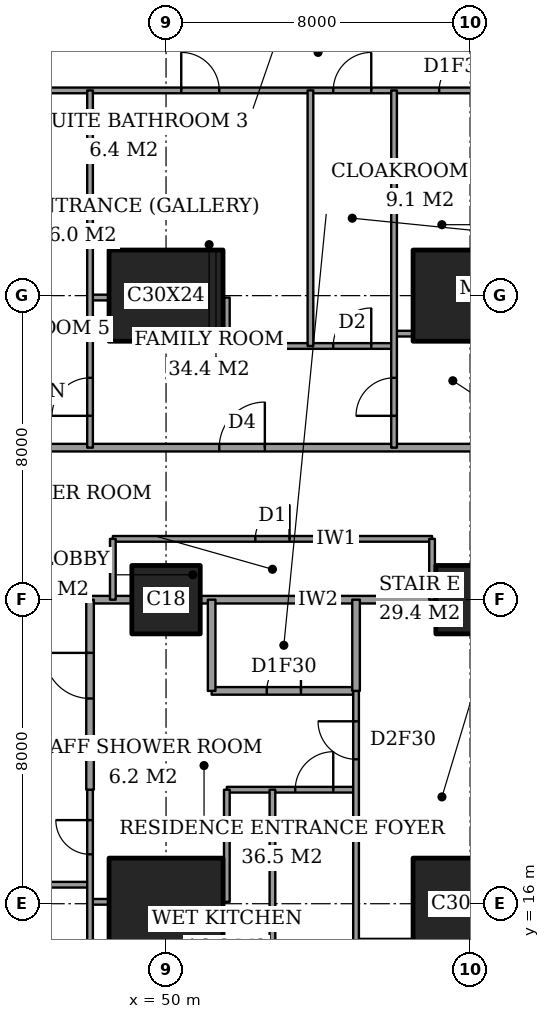
"""IFC4 building model, lengths in metres.
Left out: names, types, materials, properties, quantities, classifications, styles, units other than length and angle.
Written with IfcOpenShell. Run it as: python <this file> out.ifc"""

import sys

from ifc_helpers import new_model, si_unit, direction, frame, frame_2d, origin, origin_2d, place, context, subcontext, project, spatial, rectangle, extrude, element, fill, save


model = new_model("IFC4")
c1 = context("Model", 3, precision=1e-05, world=origin(), true_north=direction((0.0, 1.0)))
c2 = subcontext(c1, "Body", "Model", "MODEL_VIEW")
j1 = project(units=[si_unit("LENGTHUNIT", "METRE"), si_unit("PLANEANGLEUNIT", "RADIAN")], contexts=[c1])
p1 = place(None, origin())
s1 = spatial("IfcSite", under=j1, at=p1, CompositionType="ELEMENT")
p2 = place(p1, origin())
s2 = spatial("IfcBuilding", under=s1, at=p2, CompositionType="ELEMENT")
p3 = place(p2, frame((0.0, 0.0, 196.6)))
s3 = spatial("IfcBuildingStorey", under=s2, at=p3, CompositionType="ELEMENT", Elevation=196.6)
p4 = place(p3, frame((50.0, 16.0, 0.0), z_axis=(0.0, 0.0, 1.0), x_axis=(1.0, 0.0, 0.0)))
e1 = element("IfcColumn", 1, at=p4, inside=s3, PredefinedType="COLUMN", context=c2, shape_type="SweptSolid", body=[
    extrude(rectangle(XDim=3.0, YDim=2.4, at=origin_2d()), origin(), (0.0, 0.0, 1.0), 3.6),
])
p5 = place(p3, frame((50.0, 24.0, 0.0), z_axis=(0.0, 0.0, 1.0), x_axis=(1.0, 0.0, 0.0)))
e2 = element("IfcColumn", 2, at=p5, inside=s3, PredefinedType="COLUMN", context=c2, shape_type="SweptSolid", body=[
    extrude(rectangle(XDim=1.8, YDim=1.8, at=origin_2d()), origin(), (0.0, 0.0, 1.0), 3.6),
])
for number, where, z_axis, x_axis in (
    (3, (50.0, 32.0, 0.0), (0.0, 0.0, 1.0), (1.0, 0.0, 0.0)),
    (4, (58.0, 16.0, 0.0), (0.0, 0.0, 1.0), (1.0, 0.0, 0.0)),
):
    element("IfcColumn", number, at=place(p3, frame(where, z_axis=z_axis, x_axis=x_axis)), inside=s3, PredefinedType="COLUMN", context=c2, shape_type="SweptSolid", body=[
        extrude(rectangle(XDim=3.0, YDim=2.4, at=origin_2d()), origin(), (0.0, 0.0, 1.0), 3.6),
    ])
p6 = place(p3, frame((58.0, 24.0, 0.0), z_axis=(0.0, 0.0, 1.0), x_axis=(1.0, 0.0, 0.0)))
e5 = element("IfcColumn", 5, at=p6, inside=s3, PredefinedType="COLUMN", context=c2, shape_type="SweptSolid", body=[
    extrude(rectangle(XDim=1.8, YDim=1.8, at=origin_2d()), origin(), (0.0, 0.0, 1.0), 3.6),
])
p7 = place(p3, frame((58.0, 32.0, 0.0), z_axis=(0.0, 0.0, 1.0), x_axis=(1.0, 0.0, 0.0)))
e6 = element("IfcColumn", 6, at=p7, inside=s3, PredefinedType="COLUMN", context=c2, shape_type="SweptSolid", body=[
    extrude(rectangle(XDim=3.0, YDim=2.4, at=origin_2d()), origin(), (0.0, 0.0, 1.0), 3.6),
])
p8 = place(p3, frame((55.0, 15.0, 0.0), z_axis=(0.0, 0.0, 1.0), x_axis=(1.0, 0.0, 0.0)))
e7 = element("IfcWall", 7, at=p8, inside=s3, PredefinedType="PARTITIONING", context=c2, shape_type="SweptSolid", body=[
    extrude(rectangle(XDim=1.5, YDim=0.15, at=frame_2d((0.75, 0.0))), origin(), (0.0, 0.0, 1.0), 3.35),
])
p9 = place(p3, frame((48.0, 16.05, 0.0), z_axis=(0.0, 0.0, 1.0), x_axis=(1.0, 0.0, 0.0)))
e8 = element("IfcWall", 8, at=p9, inside=s3, PredefinedType="PARTITIONING", context=c2, shape_type="SweptSolid", body=[
    extrude(rectangle(XDim=0.5, YDim=0.15, at=frame_2d((0.25, 0.0))), origin(), (0.0, 0.0, 1.0), 3.35),
])
p10 = place(p3, frame((42.0, 16.5, 0.0), z_axis=(0.0, 0.0, 1.0), x_axis=(1.0, 0.0, 0.0)))
e9 = element("IfcWall", 9, at=p10, inside=s3, PredefinedType="PARTITIONING", context=c2, shape_type="SweptSolid", body=[
    extrude(rectangle(XDim=6.0, YDim=0.15, at=frame_2d((3.0, 0.0))), origin(), (0.0, 0.0, 1.0), 3.35),
])
p11 = place(p3, frame((51.6, 19.0, 0.0), z_axis=(0.0, 0.0, 1.0), x_axis=(1.0, 0.0, 0.0)))
e10 = element("IfcWall", 10, at=p11, inside=s3, PredefinedType="PARTITIONING", context=c2, shape_type="SweptSolid", body=[
    extrude(rectangle(XDim=3.4, YDim=0.15, at=frame_2d((1.7, 0.0))), origin(), (0.0, 0.0, 1.0), 3.35),
])
p12 = place(p11, frame((1.8, 0.0, 0.0)))
e11 = element("IfcOpeningElement", 11, at=p12, cuts=e10, PredefinedType="OPENING", context=c2, shape_type="SweptSolid", body=[
    extrude(rectangle(XDim=1.0, YDim=2.1, at=frame_2d((0.5, 1.05))), frame((0.0, 0.085, 0.0), z_axis=(0.0, -1.0, 0.0), x_axis=(1.0, 0.0, 0.0)), (0.0, 0.0, 1.0), 0.17),
])
p13 = place(p3, frame((42.0, 20.0, 0.0), z_axis=(0.0, 0.0, 1.0), x_axis=(1.0, 0.0, 0.0)))
e12 = element("IfcWall", 12, at=p13, inside=s3, PredefinedType="PARTITIONING", context=c2, shape_type="SweptSolid", body=[
    extrude(rectangle(XDim=6.0, YDim=0.2, at=frame_2d((3.0, 0.0))), origin(), (0.0, 0.0, 1.0), 3.35),
])
p14 = place(p3, frame((51.2, 21.6, 0.0), z_axis=(0.0, 0.0, 1.0), x_axis=(1.0, 0.0, 0.0)))
e13 = element("IfcWall", 13, at=p14, inside=s3, PredefinedType="PARTITIONING", context=c2, shape_type="SweptSolid", body=[
    extrude(rectangle(XDim=3.8, YDim=0.2, at=frame_2d((1.9, 0.0))), origin(), (0.0, 0.0, 1.0), 3.35),
])
p15 = place(p14, frame((1.45, 0.0, 0.0)))
e14 = element("IfcOpeningElement", 14, at=p15, cuts=e13, PredefinedType="OPENING", context=c2, shape_type="SweptSolid", body=[
    extrude(rectangle(XDim=0.9, YDim=2.1, at=frame_2d((0.45, 1.05))), frame((0.0, 0.11, 0.0), z_axis=(0.0, -1.0, 0.0), x_axis=(1.0, 0.0, 0.0)), (0.0, 0.0, 1.0), 0.22),
])
p16 = place(p3, frame((48.0, 24.0, 0.0), z_axis=(0.0, 0.0, 1.0), x_axis=(1.0, 0.0, 0.0)))
e15 = element("IfcWall", 15, at=p16, inside=s3, PredefinedType="PARTITIONING", context=c2, shape_type="SweptSolid", body=[
    extrude(rectangle(XDim=1.1, YDim=0.2, at=frame_2d((0.55, 0.0))), origin(), (0.0, 0.0, 1.0), 3.35),
])
p17 = place(p3, frame((50.9, 24.0, 0.0), z_axis=(0.0, 0.0, 1.0), x_axis=(1.0, 0.0, 0.0)))
e16 = element("IfcWall", 16, at=p17, inside=s3, PredefinedType="PARTITIONING", context=c2, shape_type="SweptSolid", body=[
    extrude(rectangle(XDim=6.2, YDim=0.2, at=frame_2d((3.1, 0.0))), origin(), (0.0, 0.0, 1.0), 3.35),
])
p18 = place(p3, frame((48.6, 25.6, 0.0), z_axis=(0.0, 0.0, 1.0), x_axis=(1.0, 0.0, 0.0)))
e17 = element("IfcWall", 17, at=p18, inside=s3, PredefinedType="PARTITIONING", context=c2, shape_type="SweptSolid", body=[
    extrude(rectangle(XDim=8.4, YDim=0.15, at=frame_2d((4.2, 0.0))), origin(), (0.0, 0.0, 1.0), 3.35),
])
p19 = place(p18, frame((3.75, 0.0, 0.0)))
e18 = element("IfcOpeningElement", 18, at=p19, cuts=e17, PredefinedType="OPENING", context=c2, shape_type="SweptSolid", body=[
    extrude(rectangle(XDim=0.9, YDim=2.1, at=frame_2d((0.45, 1.05))), frame((0.0, 0.085, 0.0), z_axis=(0.0, -1.0, 0.0), x_axis=(1.0, 0.0, 0.0)), (0.0, 0.0, 1.0), 0.17),
])
p20 = place(p3, frame((42.0, 28.0, 0.0), z_axis=(0.0, 0.0, 1.0), x_axis=(1.0, 0.0, 0.0)))
e19 = element("IfcWall", 19, at=p20, inside=s3, PredefinedType="PARTITIONING", context=c2, shape_type="SweptSolid", body=[
    extrude(rectangle(XDim=17.275, YDim=0.2, at=frame_2d((8.637, 0.0))), origin(), (0.0, 0.0, 1.0), 3.35),
])
p21 = place(p20, frame((9.4, 0.0, 0.0)))
e20 = element("IfcOpeningElement", 20, at=p21, cuts=e19, PredefinedType="OPENING", context=c2, shape_type="SweptSolid", body=[
    extrude(rectangle(XDim=1.2, YDim=2.4, at=frame_2d((0.6, 1.2))), frame((0.0, 0.11, 0.0), z_axis=(0.0, -1.0, 0.0), x_axis=(1.0, 0.0, 0.0)), (0.0, 0.0, 1.0), 0.22),
])
p22 = place(p3, frame((51.6, 30.675, 0.0), z_axis=(0.0, 0.0, 1.0), x_axis=(1.0, 0.0, 0.0)))
e21 = element("IfcWall", 21, at=p22, inside=s3, PredefinedType="PARTITIONING", context=c2, shape_type="SweptSolid", body=[
    extrude(rectangle(XDim=4.4, YDim=0.15, at=frame_2d((2.2, 0.0))), origin(), (0.0, 0.0, 1.0), 3.35),
])
p23 = place(p22, frame((2.8, 0.0, 0.0)))
e22 = element("IfcOpeningElement", 22, at=p23, cuts=e21, PredefinedType="OPENING", context=c2, shape_type="SweptSolid", body=[
    extrude(rectangle(XDim=1.0, YDim=2.1, at=frame_2d((0.5, 1.05))), frame((0.0, 0.085, 0.0), z_axis=(0.0, -1.0, 0.0), x_axis=(1.0, 0.0, 0.0)), (0.0, 0.0, 1.0), 0.17),
])
p24 = place(p3, frame((42.0, 31.0, 0.0), z_axis=(0.0, 0.0, 1.0), x_axis=(1.0, 0.0, 0.0)))
e23 = element("IfcWall", 23, at=p24, inside=s3, PredefinedType="PARTITIONING", context=c2, shape_type="SweptSolid", body=[
    extrude(rectangle(XDim=6.0, YDim=0.15, at=frame_2d((3.0, 0.0))), origin(), (0.0, 0.0, 1.0), 3.35),
])
for number, where, z_axis, x_axis in (
    (24, (56.0, 31.0, 0.0), (0.0, 0.0, 1.0), (1.0, 0.0, 0.0)),
    (25, (48.0, 31.95, 0.0), (0.0, 0.0, 1.0), (1.0, 0.0, 0.0)),
):
    element("IfcWall", number, at=place(p3, frame(where, z_axis=z_axis, x_axis=x_axis)), inside=s3, PredefinedType="PARTITIONING", context=c2, shape_type="SweptSolid", body=[
        extrude(rectangle(XDim=0.5, YDim=0.15, at=frame_2d((0.25, 0.0))), origin(), (0.0, 0.0, 1.0), 3.35),
    ])
p25 = place(p3, frame((45.6, 33.6, 0.0), z_axis=(0.0, 0.0, 1.0), x_axis=(1.0, 0.0, 0.0)))
e26 = element("IfcWall", 26, at=p25, inside=s3, PredefinedType="PARTITIONING", context=c2, shape_type="SweptSolid", body=[
    extrude(rectangle(XDim=2.4, YDim=0.15, at=frame_2d((1.2, 0.0))), origin(), (0.0, 0.0, 1.0), 3.35),
])
p26 = place(p3, frame((41.439, 37.4, 0.0), z_axis=(0.0, 0.0, 1.0), x_axis=(1.0, 0.0, 0.0)))
e27 = element("IfcWall", 27, at=p26, inside=s3, PredefinedType="PARTITIONING", context=c2, shape_type="SweptSolid", body=[
    extrude(rectangle(XDim=25.011, YDim=0.15, at=frame_2d((12.505, 0.0))), origin(), (0.0, 0.0, 1.0), 3.35),
])
p27 = place(p26, frame((12.961, 0.0, 0.0)))
e28 = element("IfcOpeningElement", 28, at=p27, cuts=e27, PredefinedType="OPENING", context=c2, shape_type="SweptSolid", body=[
    extrude(rectangle(XDim=1.0, YDim=2.1, at=frame_2d((0.5, 1.05))), frame((0.0, 0.085, 0.0), z_axis=(0.0, -1.0, 0.0), x_axis=(1.0, 0.0, 0.0)), (0.0, 0.0, 1.0), 0.17),
])
p28 = place(p26, frame((20.924, 0.0, 0.0)))
e29 = element("IfcOpeningElement", 29, at=p28, cuts=e27, PredefinedType="OPENING", context=c2, shape_type="SweptSolid", body=[
    extrude(rectangle(XDim=1.0, YDim=2.1, at=frame_2d((0.5, 1.05))), frame((0.0, 0.085, 0.0), z_axis=(0.0, -1.0, 0.0), x_axis=(1.0, 0.0, 0.0)), (0.0, 0.0, 1.0), 0.17),
])
p29 = place(p26, frame((15.749, 0.0, 0.0)))
e30 = element("IfcOpeningElement", 30, at=p29, cuts=e27, PredefinedType="OPENING", context=c2, shape_type="SweptSolid", body=[
    extrude(rectangle(XDim=0.9, YDim=2.1, at=frame_2d((0.45, 1.05))), frame((0.0, 0.085, 0.0), z_axis=(0.0, -1.0, 0.0), x_axis=(1.0, 0.0, 0.0)), (0.0, 0.0, 1.0), 0.17),
])
p30 = place(p26, frame((8.961, 0.0, 0.0)))
e31 = element("IfcOpeningElement", 31, at=p30, cuts=e27, PredefinedType="OPENING", context=c2, shape_type="SweptSolid", body=[
    extrude(rectangle(XDim=1.0, YDim=2.1, at=frame_2d((0.5, 1.05))), frame((0.0, 0.085, 0.0), z_axis=(0.0, -1.0, 0.0), x_axis=(1.0, 0.0, 0.0)), (0.0, 0.0, 1.0), 0.17),
])
p31 = place(p26, frame((2.836, 0.0, 0.0)))
e32 = element("IfcOpeningElement", 32, at=p31, cuts=e27, PredefinedType="OPENING", context=c2, shape_type="SweptSolid", body=[
    extrude(rectangle(XDim=1.0, YDim=2.1, at=frame_2d((0.5, 1.05))), frame((0.0, 0.085, 0.0), z_axis=(0.0, -1.0, 0.0), x_axis=(1.0, 0.0, 0.0)), (0.0, 0.0, 1.0), 0.17),
])
p32 = place(p3, frame((48.0, 19.0, 0.0), z_axis=(0.0, 0.0, 1.0), x_axis=(0.0, 1.0, 0.0)))
e33 = element("IfcWall", 33, at=p32, inside=s3, PredefinedType="PARTITIONING", context=c2, shape_type="SweptSolid", body=[
    extrude(rectangle(XDim=5.0, YDim=0.2, at=frame_2d((2.5, 0.0))), origin(), (0.0, 0.0, 1.0), 3.35),
])
p33 = place(p32, frame((2.4, 0.0, 0.0)))
e34 = element("IfcOpeningElement", 34, at=p33, cuts=e33, PredefinedType="OPENING", context=c2, shape_type="SweptSolid", body=[
    extrude(rectangle(XDim=1.2, YDim=2.4, at=frame_2d((0.6, 1.2))), frame((0.0, 0.11, 0.0), z_axis=(0.0, -1.0, 0.0), x_axis=(1.0, 0.0, 0.0)), (0.0, 0.0, 1.0), 0.22),
])
p34 = place(p3, frame((48.0, 10.6, 0.0), z_axis=(0.0, 0.0, 1.0), x_axis=(0.0, 1.0, 0.0)))
e35 = element("IfcWall", 35, at=p34, inside=s3, PredefinedType="PARTITIONING", context=c2, shape_type="SweptSolid", body=[
    extrude(rectangle(XDim=8.4, YDim=0.15, at=frame_2d((4.2, 0.0))), origin(), (0.0, 0.0, 1.0), 3.35),
])
p35 = place(p34, frame((6.7, 0.0, 0.0)))
e36 = element("IfcOpeningElement", 36, at=p35, cuts=e35, PredefinedType="OPENING", context=c2, shape_type="SweptSolid", body=[
    extrude(rectangle(XDim=0.9, YDim=2.1, at=frame_2d((0.45, 1.05))), frame((0.0, 0.085, 0.0), z_axis=(0.0, -1.0, 0.0), x_axis=(1.0, 0.0, 0.0)), (0.0, 0.0, 1.0), 0.17),
])
p36 = place(p3, frame((48.0, 28.0, 0.0), z_axis=(0.0, 0.0, 1.0), x_axis=(0.0, 1.0, 0.0)))
e37 = element("IfcWall", 37, at=p36, inside=s3, PredefinedType="PARTITIONING", context=c2, shape_type="SweptSolid", body=[
    extrude(rectangle(XDim=9.4, YDim=0.15, at=frame_2d((4.7, 0.0))), origin(), (0.0, 0.0, 1.0), 3.35),
])
p37 = place(p36, frame((0.837, 0.0, 0.0)))
e38 = element("IfcOpeningElement", 38, at=p37, cuts=e37, PredefinedType="OPENING", context=c2, shape_type="SweptSolid", body=[
    extrude(rectangle(XDim=1.0, YDim=2.1, at=frame_2d((0.5, 1.05))), frame((0.0, 0.085, 0.0), z_axis=(0.0, -1.0, 0.0), x_axis=(1.0, 0.0, 0.0)), (0.0, 0.0, 1.0), 0.17),
])
p38 = place(p3, frame((48.6, 24.0, 0.0), z_axis=(0.0, 0.0, 1.0), x_axis=(0.0, 1.0, 0.0)))
e39 = element("IfcWall", 39, at=p38, inside=s3, PredefinedType="PARTITIONING", context=c2, shape_type="SweptSolid", body=[
    extrude(rectangle(XDim=1.6, YDim=0.15, at=frame_2d((0.8, 0.0))), origin(), (0.0, 0.0, 1.0), 3.35),
])
p39 = place(p3, frame((51.2, 21.6, 0.0), z_axis=(0.0, 0.0, 1.0), x_axis=(0.0, 1.0, 0.0)))
e40 = element("IfcWall", 40, at=p39, inside=s3, PredefinedType="PARTITIONING", context=c2, shape_type="SweptSolid", body=[
    extrude(rectangle(XDim=2.4, YDim=0.2, at=frame_2d((1.2, 0.0))), origin(), (0.0, 0.0, 1.0), 3.35),
])
p40 = place(p3, frame((51.6, 16.05, 0.0), z_axis=(0.0, 0.0, 1.0), x_axis=(0.0, 1.0, 0.0)))
e41 = element("IfcWall", 41, at=p40, inside=s3, PredefinedType="PARTITIONING", context=c2, shape_type="SweptSolid", body=[
    extrude(rectangle(XDim=2.95, YDim=0.15, at=frame_2d((1.475, 0.0))), origin(), (0.0, 0.0, 1.0), 3.35),
])
p41 = place(p3, frame((51.6, 30.675, 0.0), z_axis=(0.0, 0.0, 1.0), x_axis=(0.0, 1.0, 0.0)))
e42 = element("IfcWall", 42, at=p41, inside=s3, PredefinedType="PARTITIONING", context=c2, shape_type="SweptSolid", body=[
    extrude(rectangle(XDim=1.275, YDim=0.15, at=frame_2d((0.637, 0.0))), origin(), (0.0, 0.0, 1.0), 3.35),
])
p42 = place(p3, frame((52.8, 10.6, 0.0), z_axis=(0.0, 0.0, 1.0), x_axis=(0.0, 1.0, 0.0)))
e43 = element("IfcWall", 43, at=p42, inside=s3, PredefinedType="PARTITIONING", context=c2, shape_type="SweptSolid", body=[
    extrude(rectangle(XDim=8.4, YDim=0.15, at=frame_2d((4.2, 0.0))), origin(), (0.0, 0.0, 1.0), 3.35),
])
p43 = place(p3, frame((53.8, 30.675, 0.0), z_axis=(0.0, 0.0, 1.0), x_axis=(0.0, 1.0, 0.0)))
e44 = element("IfcWall", 44, at=p43, inside=s3, PredefinedType="PARTITIONING", context=c2, shape_type="SweptSolid", body=[
    extrude(rectangle(XDim=6.725, YDim=0.15, at=frame_2d((3.362, 0.0))), origin(), (0.0, 0.0, 1.0), 3.35),
])
p44 = place(p3, frame((55.0, 21.6, 0.0), z_axis=(0.0, 0.0, 1.0), x_axis=(0.0, 1.0, 0.0)))
e45 = element("IfcWall", 45, at=p44, inside=s3, PredefinedType="PARTITIONING", context=c2, shape_type="SweptSolid", body=[
    extrude(rectangle(XDim=2.4, YDim=0.2, at=frame_2d((1.2, 0.0))), origin(), (0.0, 0.0, 1.0), 3.35),
])
p45 = place(p3, frame((55.0, 10.6, 0.0), z_axis=(0.0, 0.0, 1.0), x_axis=(0.0, 1.0, 0.0)))
e46 = element("IfcWall", 46, at=p45, inside=s3, PredefinedType="PARTITIONING", context=c2, shape_type="SweptSolid", body=[
    extrude(rectangle(XDim=11.0, YDim=0.15, at=frame_2d((5.5, 0.0))), origin(), (0.0, 0.0, 1.0), 3.35),
])
p46 = place(p45, frame((9.2, 0.0, 0.0)))
e47 = element("IfcOpeningElement", 47, at=p46, cuts=e46, PredefinedType="OPENING", context=c2, shape_type="SweptSolid", body=[
    extrude(rectangle(XDim=1.0, YDim=2.1, at=frame_2d((0.5, 1.05))), frame((0.0, 0.085, 0.0), z_axis=(0.0, -1.0, 0.0), x_axis=(1.0, 0.0, 0.0)), (0.0, 0.0, 1.0), 0.17),
])
p47 = place(p3, frame((56.0, 28.0, 0.0), z_axis=(0.0, 0.0, 1.0), x_axis=(0.0, 1.0, 0.0)))
e48 = element("IfcWall", 48, at=p47, inside=s3, PredefinedType="PARTITIONING", context=c2, shape_type="SweptSolid", body=[
    extrude(rectangle(XDim=9.4, YDim=0.15, at=frame_2d((4.7, 0.0))), origin(), (0.0, 0.0, 1.0), 3.35),
])
p48 = place(p47, frame((0.837, 0.0, 0.0)))
e49 = element("IfcOpeningElement", 49, at=p48, cuts=e48, PredefinedType="OPENING", context=c2, shape_type="SweptSolid", body=[
    extrude(rectangle(XDim=1.0, YDim=2.1, at=frame_2d((0.5, 1.05))), frame((0.0, 0.085, 0.0), z_axis=(0.0, -1.0, 0.0), x_axis=(1.0, 0.0, 0.0)), (0.0, 0.0, 1.0), 0.17),
])
p49 = place(p3, frame((57.0, 24.0, 0.0), z_axis=(0.0, 0.0, 1.0), x_axis=(0.0, 1.0, 0.0)))
e50 = element("IfcWall", 50, at=p49, inside=s3, PredefinedType="PARTITIONING", context=c2, shape_type="SweptSolid", body=[
    extrude(rectangle(XDim=1.6, YDim=0.15, at=frame_2d((0.8, 0.0))), origin(), (0.0, 0.0, 1.0), 3.35),
])
p50 = place(p46, origin())
e51 = element("IfcDoor", 51, at=p50, inside=s3, OperationType="SINGLE_SWING_LEFT", PredefinedType="DOOR", context=c2, shape_type="SweptSolid", body=[
    extrude(rectangle(XDim=1.0, YDim=2.1, at=frame_2d((0.5, 1.05))), frame((0.0, 0.025, 0.0), z_axis=(0.0, -1.0, 0.0), x_axis=(1.0, 0.0, 0.0)), (0.0, 0.0, 1.0), 0.05),
])
fill(e47, e51)
p51 = place(p15, origin())
e52 = element("IfcDoor", 52, at=p51, inside=s3, OperationType="SINGLE_SWING_LEFT", PredefinedType="DOOR", context=c2, shape_type="SweptSolid", body=[
    extrude(rectangle(XDim=0.9, YDim=2.1, at=frame_2d((0.45, 1.05))), frame((0.0, 0.025, 0.0), z_axis=(0.0, -1.0, 0.0), x_axis=(1.0, 0.0, 0.0)), (0.0, 0.0, 1.0), 0.05),
])
fill(e14, e52)
p52 = place(p33, origin())
e53 = element("IfcDoor", 53, at=p52, inside=s3, OperationType="SINGLE_SWING_LEFT", PredefinedType="DOOR", context=c2, shape_type="SweptSolid", body=[
    extrude(rectangle(XDim=1.2, YDim=2.4, at=frame_2d((0.6, 1.2))), frame((0.0, 0.025, 0.0), z_axis=(0.0, -1.0, 0.0), x_axis=(1.0, 0.0, 0.0)), (0.0, 0.0, 1.0), 0.05),
])
fill(e34, e53)
p53 = place(p12, origin())
e54 = element("IfcDoor", 54, at=p53, inside=s3, OperationType="SINGLE_SWING_LEFT", PredefinedType="DOOR", context=c2, shape_type="SweptSolid", body=[
    extrude(rectangle(XDim=1.0, YDim=2.1, at=frame_2d((0.5, 1.05))), frame((0.0, 0.025, 0.0), z_axis=(0.0, -1.0, 0.0), x_axis=(1.0, 0.0, 0.0)), (0.0, 0.0, 1.0), 0.05),
])
fill(e11, e54)
p54 = place(p35, origin())
e55 = element("IfcDoor", 55, at=p54, inside=s3, OperationType="SINGLE_SWING_LEFT", PredefinedType="DOOR", context=c2, shape_type="SweptSolid", body=[
    extrude(rectangle(XDim=0.9, YDim=2.1, at=frame_2d((0.45, 1.05))), frame((0.0, 0.025, 0.0), z_axis=(0.0, -1.0, 0.0), x_axis=(1.0, 0.0, 0.0)), (0.0, 0.0, 1.0), 0.05),
])
fill(e36, e55)
p55 = place(p27, origin())
e56 = element("IfcDoor", 56, at=p55, inside=s3, OperationType="SINGLE_SWING_LEFT", PredefinedType="DOOR", context=c2, shape_type="SweptSolid", body=[
    extrude(rectangle(XDim=1.0, YDim=2.1, at=frame_2d((0.5, 1.05))), frame((0.0, 0.025, 0.0), z_axis=(0.0, -1.0, 0.0), x_axis=(1.0, 0.0, 0.0)), (0.0, 0.0, 1.0), 0.05),
])
fill(e28, e56)
p56 = place(p29, origin())
e57 = element("IfcDoor", 57, at=p56, inside=s3, OperationType="SINGLE_SWING_LEFT", PredefinedType="DOOR", context=c2, shape_type="SweptSolid", body=[
    extrude(rectangle(XDim=0.9, YDim=2.1, at=frame_2d((0.45, 1.05))), frame((0.0, 0.025, 0.0), z_axis=(0.0, -1.0, 0.0), x_axis=(1.0, 0.0, 0.0)), (0.0, 0.0, 1.0), 0.05),
])
fill(e30, e57)
p57 = place(p48, origin())
e58 = element("IfcDoor", 58, at=p57, inside=s3, OperationType="SINGLE_SWING_RIGHT", PredefinedType="DOOR", context=c2, shape_type="SweptSolid", body=[
    extrude(rectangle(XDim=1.0, YDim=2.1, at=frame_2d((0.5, 1.05))), frame((0.0, 0.025, 0.0), z_axis=(0.0, -1.0, 0.0), x_axis=(1.0, 0.0, 0.0)), (0.0, 0.0, 1.0), 0.05),
])
fill(e49, e58)
p58 = place(p21, origin())
e59 = element("IfcDoor", 59, at=p58, inside=s3, OperationType="SINGLE_SWING_LEFT", PredefinedType="DOOR", context=c2, shape_type="SweptSolid", body=[
    extrude(rectangle(XDim=1.2, YDim=2.4, at=frame_2d((0.6, 1.2))), frame((0.0, 0.025, 0.0), z_axis=(0.0, -1.0, 0.0), x_axis=(1.0, 0.0, 0.0)), (0.0, 0.0, 1.0), 0.05),
])
fill(e20, e59)
p59 = place(p23, origin())
e60 = element("IfcDoor", 60, at=p59, inside=s3, OperationType="SINGLE_SWING_LEFT", PredefinedType="DOOR", context=c2, shape_type="SweptSolid", body=[
    extrude(rectangle(XDim=1.0, YDim=2.1, at=frame_2d((0.5, 1.05))), frame((0.0, 0.025, 0.0), z_axis=(0.0, -1.0, 0.0), x_axis=(1.0, 0.0, 0.0)), (0.0, 0.0, 1.0), 0.05),
])
fill(e22, e60)
p60 = place(p30, origin())
e61 = element("IfcDoor", 61, at=p60, inside=s3, OperationType="SINGLE_SWING_RIGHT", PredefinedType="DOOR", context=c2, shape_type="SweptSolid", body=[
    extrude(rectangle(XDim=1.0, YDim=2.1, at=frame_2d((0.5, 1.05))), frame((0.0, 0.025, 0.0), z_axis=(0.0, -1.0, 0.0), x_axis=(1.0, 0.0, 0.0)), (0.0, 0.0, 1.0), 0.05),
])
fill(e31, e61)
p61 = place(p37, origin())
e62 = element("IfcDoor", 62, at=p61, inside=s3, OperationType="SINGLE_SWING_RIGHT", PredefinedType="DOOR", context=c2, shape_type="SweptSolid", body=[
    extrude(rectangle(XDim=1.0, YDim=2.1, at=frame_2d((0.5, 1.05))), frame((0.0, 0.025, 0.0), z_axis=(0.0, -1.0, 0.0), x_axis=(1.0, 0.0, 0.0)), (0.0, 0.0, 1.0), 0.05),
])
fill(e38, e62)
p62 = place(p19, origin())
e63 = element("IfcDoor", 63, at=p62, inside=s3, OperationType="SINGLE_SWING_LEFT", PredefinedType="DOOR", context=c2, shape_type="SweptSolid", body=[
    extrude(rectangle(XDim=0.9, YDim=2.1, at=frame_2d((0.45, 1.05))), frame((0.0, 0.025, 0.0), z_axis=(0.0, -1.0, 0.0), x_axis=(1.0, 0.0, 0.0)), (0.0, 0.0, 1.0), 0.05),
])
fill(e18, e63)
save(model, sys.argv[1])
